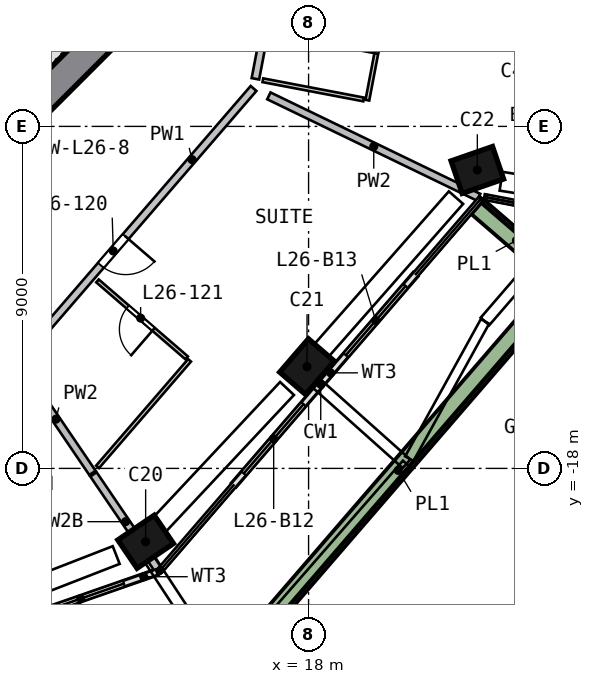
"""IFC4 building model, lengths in metres.
Left out: names, types, materials, properties, quantities, classifications, styles, units other than length and angle.
Written with IfcOpenShell. Run it as: python <this file> out.ifc"""

import sys

from ifc_helpers import new_model, si_unit, direction, frame, frame_2d, origin, origin_2d, place, context, subcontext, project, spatial, rectangle, extrude, element, fill, save


model = new_model("IFC4")
c1 = context("Model", 3, precision=1e-05, world=origin(), true_north=direction((0.0, 1.0)))
c2 = subcontext(c1, "Body", "Model", "MODEL_VIEW")
j1 = project(units=[si_unit("LENGTHUNIT", "METRE"), si_unit("PLANEANGLEUNIT", "RADIAN")], contexts=[c1])
p1 = place(None, origin())
s1 = spatial("IfcSite", under=j1, at=p1, CompositionType="ELEMENT")
p2 = place(p1, origin())
s2 = spatial("IfcBuilding", under=s1, at=p2, CompositionType="ELEMENT")
p3 = place(p2, frame((0.0, 0.0, 111.5)))
s3 = spatial("IfcBuildingStorey", under=s2, at=p3, CompositionType="ELEMENT", Elevation=111.5)
p4 = place(p3, frame((13.598, -20.009, 0.0), z_axis=(0.09457705, 0.065458875, 0.993363135), x_axis=(-0.821576739, -0.558375251, 0.115016268)))
e1 = element("IfcColumn", 1, at=p4, inside=s3, PredefinedType="COLUMN", context=c2, shape_type="SweptSolid", body=[
    extrude(rectangle(XDim=1.15, YDim=0.9, at=origin_2d()), origin(), (0.0, 0.0, 1.0), 3.211),
])
p5 = place(p3, frame((17.871, -15.426, 0.0), z_axis=(0.072703894, 0.085632411, 0.993670586), x_axis=(0.649524072, 0.751997746, -0.112329288)))
e2 = element("IfcColumn", 2, at=p5, inside=s3, PredefinedType="COLUMN", context=c2, shape_type="SweptSolid", body=[
    extrude(rectangle(XDim=1.15, YDim=0.9, at=origin_2d()), origin(), (0.0, 0.0, 1.0), 3.21),
])
p6 = place(p3, frame((22.383, -10.276, 0.0), z_axis=(0.047961216, 0.106791613, 0.993123997), x_axis=(-0.943604667, -0.32123545, 0.080112533)))
e3 = element("IfcColumn", 3, at=p6, inside=s3, PredefinedType="COLUMN", context=c2, shape_type="SweptSolid", body=[
    extrude(rectangle(XDim=1.15, YDim=0.9, at=origin_2d()), origin(), (0.0, 0.0, 1.0), 3.212),
])
p7 = place(p3, frame((5.516, -13.717, 0.0), z_axis=(0.0, 0.0, 1.0), x_axis=(0.707106781, 0.707106781, 0.0)))
e4 = element("IfcWall", 4, at=p7, inside=s3, PredefinedType="SHEAR", context=c2, shape_type="SweptSolid", body=[
    extrude(rectangle(XDim=11.598, YDim=0.8, at=frame_2d((5.799, 0.0))), origin(), (0.0, 0.0, 1.0), 3.5),
])
p8 = place(p7, frame((2.099, 0.0, 0.0)))
e5 = element("IfcOpeningElement", 5, at=p8, cuts=e4, PredefinedType="OPENING", context=c2, shape_type="SweptSolid", body=[
    extrude(rectangle(XDim=1.2, YDim=2.1, at=frame_2d((0.6, 1.05))), frame((0.0, 0.41, 0.0), z_axis=(0.0, -1.0, 0.0), x_axis=(1.0, 0.0, 0.0)), (0.0, 0.0, 1.0), 0.82),
])
p9 = place(p3, frame((10.493, -21.954, 0.0), z_axis=(0.0, 0.0, 1.0), x_axis=(0.944367111, 0.328893235, 0.0)))
e6 = element("IfcWall", 6, at=p9, inside=s3, PredefinedType="SOLIDWALL", context=c2, shape_type="SweptSolid", body=[
    extrude(rectangle(XDim=3.71, YDim=0.15, at=frame_2d((1.855, 0.0))), origin(), (0.0, 0.0, 1.0), 2.425),
])
p10 = place(p9, frame((0.4, 0.0, 0.0)))
e7 = element("IfcOpeningElement", 7, at=p10, cuts=e6, PredefinedType="OPENING", context=c2, shape_type="SweptSolid", body=[
    extrude(rectangle(XDim=2.4, YDim=2.4, at=frame_2d((1.2, 1.2))), frame((0.0, 0.085, 0.0), z_axis=(0.0, -1.0, 0.0), x_axis=(1.0, 0.0, 0.0)), (0.0, 0.0, 1.0), 0.17),
])
p11 = place(p3, frame((16.036, -18.432, 0.0), z_axis=(0.0, 0.0, 1.0), x_axis=(0.653425946, 0.756990445, 0.0)))
e8 = element("IfcWall", 8, at=p11, inside=s3, PredefinedType="SOLIDWALL", context=c2, shape_type="SweptSolid", body=[
    extrude(rectangle(XDim=3.475, YDim=0.15, at=frame_2d((1.737, 0.0))), origin(), (0.0, 0.0, 1.0), 2.425),
])
p12 = place(p11, frame((0.4, 0.0, 0.0)))
e9 = element("IfcOpeningElement", 9, at=p12, cuts=e8, PredefinedType="OPENING", context=c2, shape_type="SweptSolid", body=[
    extrude(rectangle(XDim=2.4, YDim=2.4, at=frame_2d((1.2, 1.2))), frame((0.0, 0.085, 0.0), z_axis=(0.0, -1.0, 0.0), x_axis=(1.0, 0.0, 0.0)), (0.0, 0.0, 1.0), 0.17),
])
p13 = place(p3, frame((18.307, -15.802, 0.0), z_axis=(0.0, 0.0, 1.0), x_axis=(0.653392801, 0.757019054, 0.0)))
e10 = element("IfcWall", 10, at=p13, inside=s3, PredefinedType="SOLIDWALL", context=c2, shape_type="SweptSolid", body=[
    extrude(rectangle(XDim=3.835, YDim=0.15, at=frame_2d((1.918, 0.0))), origin(), (0.0, 0.0, 1.0), 2.425),
])
p14 = place(p13, frame((1.035, 0.0, 0.0)))
e11 = element("IfcOpeningElement", 11, at=p14, cuts=e10, PredefinedType="OPENING", context=c2, shape_type="SweptSolid", body=[
    extrude(rectangle(XDim=2.4, YDim=2.4, at=frame_2d((1.2, 1.2))), frame((0.0, 0.085, 0.0), z_axis=(0.0, -1.0, 0.0), x_axis=(1.0, 0.0, 0.0)), (0.0, 0.0, 1.0), 0.17),
])
p15 = place(p3, frame((15.877, -23.247, 0.0), z_axis=(0.0, 0.0, 1.0), x_axis=(0.653411418, 0.757002985, 0.0)))
e12 = element("IfcWall", 12, at=p15, inside=s3, PredefinedType="SOLIDWALL", context=c2, shape_type="SweptSolid", body=[
    extrude(rectangle(XDim=13.723, YDim=0.5, at=frame_2d((6.862, 0.0))), origin(), (0.0, 0.0, 1.0), 0.7),
])
p16 = place(p3, frame((24.491, -12.884, 0.0), z_axis=(0.0, 0.0, 1.0), x_axis=(-0.757036532, 0.65337255, 0.0)))
e13 = element("IfcWall", 13, at=p16, inside=s3, PredefinedType="SOLIDWALL", context=c2, shape_type="SweptSolid", body=[
    extrude(rectangle(XDim=2.699, YDim=0.5, at=frame_2d((1.35, 0.0))), origin(), (0.0, 0.0, 1.0), 0.7),
])
p17 = place(p3, frame((16.552, -8.002, 0.0), z_axis=(0.0, 0.0, 1.0), x_axis=(-0.653411751, -0.757002697, 0.0)))
e14 = element("IfcWall", 14, at=p17, inside=s3, PredefinedType="SOLIDWALL", context=c2, shape_type="SweptSolid", body=[
    extrude(rectangle(XDim=9.316, YDim=0.2, at=frame_2d((4.658, 0.0))), origin(), (0.0, 0.0, 1.0), 3.19),
])
p18 = place(p17, frame((5.15, 0.0, 0.0)))
e15 = element("IfcOpeningElement", 15, at=p18, cuts=e14, PredefinedType="OPENING", context=c2, shape_type="SweptSolid", body=[
    extrude(rectangle(XDim=1.0, YDim=2.1, at=frame_2d((0.5, 1.05))), frame((0.0, 0.11, 0.0), z_axis=(0.0, -1.0, 0.0), x_axis=(1.0, 0.0, 0.0)), (0.0, 0.0, 1.0), 0.22),
])
p19 = place(p3, frame((16.601, -7.748, 0.0), z_axis=(0.0, 0.0, 1.0), x_axis=(0.187422277, 0.982279436, 0.0)))
e16 = element("IfcWall", 16, at=p19, inside=s3, PredefinedType="SOLIDWALL", context=c2, shape_type="SweptSolid", body=[
    extrude(rectangle(XDim=3.4, YDim=0.2, at=frame_2d((1.7, 0.0))), origin(), (0.0, 0.0, 1.0), 3.19),
])
p20 = place(p3, frame((10.392, -15.291, 0.0), z_axis=(0.0, 0.0, 1.0), x_axis=(0.562061907, -0.827095165, 0.0)))
e17 = element("IfcWall", 17, at=p20, inside=s3, PredefinedType="SOLIDWALL", context=c2, shape_type="SweptSolid", body=[
    extrude(rectangle(XDim=3.418, YDim=0.2, at=frame_2d((1.709, 0.0))), origin(), (0.0, 0.0, 1.0), 3.19),
])
p21 = place(p3, frame((12.339, -18.156, 0.0), z_axis=(0.0, 0.0, 1.0), x_axis=(0.562123746, -0.827053138, 0.0)))
e18 = element("IfcWall", 18, at=p21, inside=s3, PredefinedType="SOLIDWALL", context=c2, shape_type="SweptSolid", body=[
    extrude(rectangle(XDim=3.011, YDim=0.2, at=frame_2d((1.506, 0.0))), origin(), (0.0, 0.0, 1.0), 2.69),
])
p22 = place(p3, frame((16.955, -8.196, 0.0), z_axis=(0.0, 0.0, 1.0), x_axis=(0.900327372, -0.435213307, 0.0)))
e19 = element("IfcWall", 19, at=p22, inside=s3, PredefinedType="SOLIDWALL", context=c2, shape_type="SweptSolid", body=[
    extrude(rectangle(XDim=6.132, YDim=0.2, at=frame_2d((3.066, 0.0))), origin(), (0.0, 0.0, 1.0), 3.19),
])
p23 = place(p3, frame((14.792, -15.091, 0.0), z_axis=(0.0, 0.0, 1.0), x_axis=(-0.75698944, 0.65342711, 0.0)))
e20 = element("IfcWall", 20, at=p23, inside=s3, PredefinedType="PARTITIONING", context=c2, shape_type="SweptSolid", body=[
    extrude(rectangle(XDim=3.1, YDim=0.1, at=frame_2d((1.55, 0.0))), origin(), (0.0, 0.0, 1.0), 3.19),
])
p24 = place(p23, frame((1.15, 0.0, 0.0)))
e21 = element("IfcOpeningElement", 21, at=p24, cuts=e20, PredefinedType="OPENING", context=c2, shape_type="SweptSolid", body=[
    extrude(rectangle(XDim=0.9, YDim=2.1, at=frame_2d((0.45, 1.05))), frame((0.0, 0.06, 0.0), z_axis=(0.0, -1.0, 0.0), x_axis=(1.0, 0.0, 0.0)), (0.0, 0.0, 1.0), 0.12),
])
p25 = place(p3, frame((14.868, -15.156, 0.0), z_axis=(0.0, 0.0, 1.0), x_axis=(-0.653436238, -0.756981561, 0.0)))
e22 = element("IfcWall", 22, at=p25, inside=s3, PredefinedType="PARTITIONING", context=c2, shape_type="SweptSolid", body=[
    extrude(rectangle(XDim=3.704, YDim=0.1, at=frame_2d((1.852, 0.0))), origin(), (0.0, 0.0, 1.0), 3.19),
])
p26 = place(p3, frame((16.797, -7.785, 0.0), z_axis=(0.0, 0.0, 1.0), x_axis=(0.982291047, -0.187361415, 0.0)))
e23 = element("IfcWall", 23, at=p26, inside=s3, PredefinedType="PARTITIONING", context=c2, shape_type="SweptSolid", body=[
    extrude(rectangle(XDim=2.7, YDim=0.1, at=frame_2d((1.35, 0.0))), origin(), (0.0, 0.0, 1.0), 3.19),
])
p27 = place(p3, frame((19.547, -8.31, 0.0), z_axis=(0.0, 0.0, 1.0), x_axis=(0.187378546, 0.982287779, 0.0)))
e24 = element("IfcWall", 24, at=p27, inside=s3, PredefinedType="PARTITIONING", context=c2, shape_type="SweptSolid", body=[
    extrude(rectangle(XDim=3.2, YDim=0.1, at=frame_2d((1.6, 0.0))), origin(), (0.0, 0.0, 1.0), 3.19),
])
p28 = place(p27, frame((1.25, 0.0, 0.0)))
e25 = element("IfcOpeningElement", 25, at=p28, cuts=e24, PredefinedType="OPENING", context=c2, shape_type="SweptSolid", body=[
    extrude(rectangle(XDim=0.9, YDim=2.1, at=frame_2d((0.45, 1.05))), frame((0.0, 0.06, 0.0), z_axis=(0.0, -1.0, 0.0), x_axis=(1.0, 0.0, 0.0)), (0.0, 0.0, 1.0), 0.12),
])
p29 = place(p10, origin())
e26 = element("IfcDoor", 26, at=p29, inside=s3, OperationType="SLIDING_TO_RIGHT", PredefinedType="DOOR", context=c2, shape_type="SweptSolid", body=[
    extrude(rectangle(XDim=2.4, YDim=2.4, at=frame_2d((1.2, 1.2))), frame((0.0, 0.025, 0.0), z_axis=(0.0, -1.0, 0.0), x_axis=(1.0, 0.0, 0.0)), (0.0, 0.0, 1.0), 0.05),
])
fill(e7, e26)
p30 = place(p12, origin())
e27 = element("IfcDoor", 27, at=p30, inside=s3, OperationType="SLIDING_TO_RIGHT", PredefinedType="DOOR", context=c2, shape_type="SweptSolid", body=[
    extrude(rectangle(XDim=2.4, YDim=2.4, at=frame_2d((1.2, 1.2))), frame((0.0, 0.025, 0.0), z_axis=(0.0, -1.0, 0.0), x_axis=(1.0, 0.0, 0.0)), (0.0, 0.0, 1.0), 0.05),
])
fill(e9, e27)
p31 = place(p14, origin())
e28 = element("IfcDoor", 28, at=p31, inside=s3, OperationType="SLIDING_TO_LEFT", PredefinedType="DOOR", context=c2, shape_type="SweptSolid", body=[
    extrude(rectangle(XDim=2.4, YDim=2.4, at=frame_2d((1.2, 1.2))), frame((0.0, 0.025, 0.0), z_axis=(0.0, -1.0, 0.0), x_axis=(1.0, 0.0, 0.0)), (0.0, 0.0, 1.0), 0.05),
])
fill(e11, e28)
p32 = place(p18, origin())
e29 = element("IfcDoor", 29, at=p32, inside=s3, OperationType="SINGLE_SWING_LEFT", PredefinedType="DOOR", context=c2, shape_type="SweptSolid", body=[
    extrude(rectangle(XDim=1.0, YDim=2.1, at=frame_2d((0.5, 1.05))), frame((0.0, 0.025, 0.0), z_axis=(0.0, -1.0, 0.0), x_axis=(1.0, 0.0, 0.0)), (0.0, 0.0, 1.0), 0.05),
])
fill(e15, e29)
p33 = place(p24, origin())
e30 = element("IfcDoor", 30, at=p33, inside=s3, OperationType="SINGLE_SWING_LEFT", PredefinedType="DOOR", context=c2, shape_type="SweptSolid", body=[
    extrude(rectangle(XDim=0.9, YDim=2.1, at=frame_2d((0.45, 1.05))), frame((0.0, 0.025, 0.0), z_axis=(0.0, -1.0, 0.0), x_axis=(1.0, 0.0, 0.0)), (0.0, 0.0, 1.0), 0.05),
])
fill(e21, e30)
p34 = place(p28, origin())
e31 = element("IfcDoor", 31, at=p34, inside=s3, OperationType="SINGLE_SWING_LEFT", PredefinedType="DOOR", context=c2, shape_type="SweptSolid", body=[
    extrude(rectangle(XDim=0.9, YDim=2.1, at=frame_2d((0.45, 1.05))), frame((0.0, 0.025, 0.0), z_axis=(0.0, -1.0, 0.0), x_axis=(1.0, 0.0, 0.0)), (0.0, 0.0, 1.0), 0.05),
])
fill(e25, e31)
save(model, sys.argv[1])
